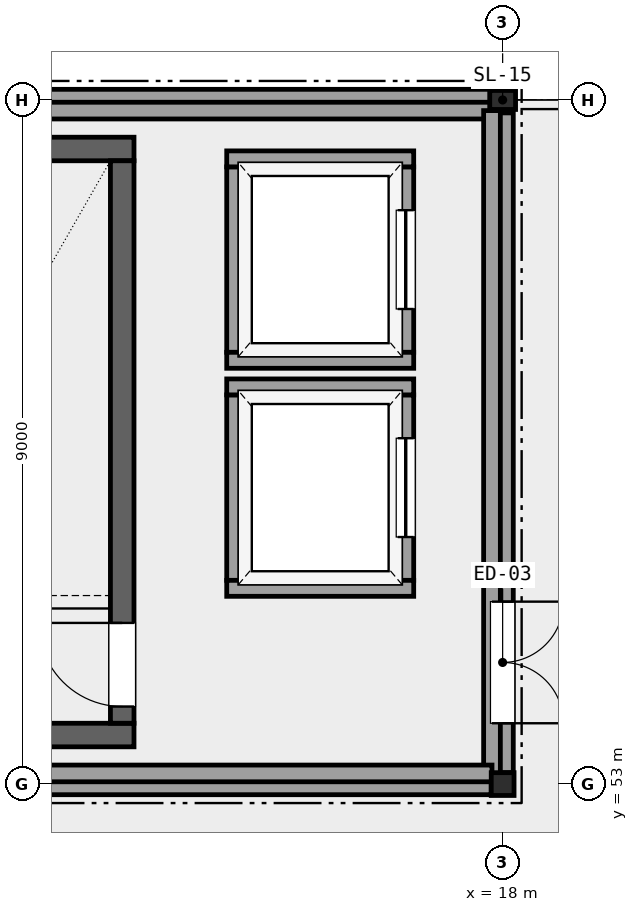
"""IFC4 building model, lengths in metres.
Left out: names, types, materials, properties, quantities, classifications, styles, units other than length and angle.
Written with IfcOpenShell. Run it as: python <this file> out.ifc"""

import sys

from ifc_helpers import new_model, si_unit, direction, frame, frame_2d, origin, origin_2d, place, context, subcontext, project, spatial, rectangle, hollow_rectangle, i_section, extrude, element, fill, save


model = new_model("IFC4")
c1 = context("Model", 3, precision=1e-05, world=origin(), true_north=direction((0.0, 1.0)))
c2 = subcontext(c1, "Body", "Model", "MODEL_VIEW")
j1 = project(units=[si_unit("LENGTHUNIT", "METRE"), si_unit("PLANEANGLEUNIT", "RADIAN")], contexts=[c1])
p1 = place(None, origin())
s1 = spatial("IfcSite", under=j1, at=p1, CompositionType="ELEMENT")
p2 = place(p1, origin())
s2 = spatial("IfcBuilding", under=s1, at=p2, CompositionType="ELEMENT")
p3 = place(p2, frame((0.0, 0.0, 13.5)))
s3 = spatial("IfcBuildingStorey", under=s2, at=p3, CompositionType="ELEMENT", Elevation=13.5)
p4 = place(p3, frame((18.0, 53.0, 0.0), z_axis=(0.0, 0.0, 1.0), x_axis=(1.0, 0.0, 0.0)))
e1 = element("IfcColumn", 1, at=p4, inside=s3, PredefinedType="COLUMN", context=c2, shape_type="SweptSolid", body=[
    extrude(hollow_rectangle(XDim=0.3, YDim=0.3, WallThickness=0.012, at=origin_2d()), origin(), (0.0, 0.0, 1.0), 4.14),
])
p5 = place(p3, frame((18.0, 62.0, 0.0), z_axis=(0.0, 0.0, 1.0), x_axis=(1.0, 0.0, 0.0)))
e2 = element("IfcColumn", 2, at=p5, inside=s3, PredefinedType="COLUMN", context=c2, shape_type="SweptSolid", body=[
    extrude(i_section(OverallWidth=0.25, OverallDepth=0.34, WebThickness=0.009, FlangeThickness=0.014, FilletRadius=0.01, at=origin_2d()), origin(), (0.0, 0.0, 1.0), 4.14),
])
for number, where, z_axis, x_axis in (
    (3, (9.125, 53.0, 0.0), (0.0, 0.0, 1.0), (1.0, 0.0, 0.0)),
    (4, (17.875, 62.0, 0.0), (0.0, 0.0, 1.0), (-1.0, 0.0, 0.0)),
):
    element("IfcWall", number, at=place(p3, frame(where, z_axis=z_axis, x_axis=x_axis)), inside=s3, PredefinedType="SOLIDWALL", context=c2, shape_type="SweptSolid", body=[
        extrude(rectangle(XDim=8.725, YDim=0.28, at=frame_2d((4.363, 0.0))), origin(), (0.0, 0.0, 1.0), 3.55),
    ])
p6 = place(p3, frame((18.0, 53.15, 0.0), z_axis=(0.0, 0.0, 1.0), x_axis=(0.0, 1.0, 0.0)))
e5 = element("IfcWall", 5, at=p6, inside=s3, PredefinedType="SOLIDWALL", context=c2, shape_type="SweptSolid", body=[
    extrude(rectangle(XDim=8.68, YDim=0.28, at=frame_2d((4.34, 0.0))), origin(), (0.0, 0.0, 1.0), 3.55),
])
p7 = place(p6, frame((2.25, 0.0, 0.0), z_axis=(0.0, 0.0, 1.0), x_axis=(-1.0, 0.0, 0.0)))
e6 = element("IfcOpeningElement", 6, at=p7, cuts=e5, PredefinedType="OPENING", context=c2, shape_type="SweptSolid", body=[
    extrude(rectangle(XDim=1.6, YDim=2.2, at=frame_2d((0.8, 1.1))), frame((0.0, 0.151, 0.0), z_axis=(0.0, -1.0, 0.0), x_axis=(1.0, 0.0, 0.0)), (0.0, 0.0, 1.0), 0.302),
])
for number, where, z_axis, x_axis in (
    (7, (9.14, 61.86, 4.2), (0.0, 0.0, 1.0), (1.0, 0.0, 0.0)),
    (8, (17.86, 61.86, 4.2), (0.0, 0.0, 1.0), (0.0, -1.0, 0.0)),
    (9, (17.86, 53.14, 4.2), (0.0, 0.0, 1.0), (-1.0, 0.0, 0.0)),
):
    element("IfcWall", number, at=place(p3, frame(where, z_axis=z_axis, x_axis=x_axis)), inside=s3, PredefinedType="PARAPET", context=c2, shape_type="SweptSolid", body=[
        extrude(rectangle(XDim=8.72, YDim=0.22, at=frame_2d((4.36, 0.0))), origin(), (0.0, 0.0, 1.0), 0.52),
    ])
for number, where, z_axis, x_axis in (
    (10, (9.25, 53.645, 0.0), (0.0, 0.0, 1.0), (1.0, 0.0, 0.0)),
    (11, (9.25, 61.355, 0.0), (0.0, 0.0, 1.0), (1.0, 0.0, 0.0)),
):
    element("IfcWall", number, at=place(p3, frame(where, z_axis=z_axis, x_axis=x_axis)), inside=s3, PredefinedType="SHEAR", context=c2, shape_type="SweptSolid", body=[
        extrude(rectangle(XDim=3.9, YDim=0.31, at=frame_2d((1.95, 0.0))), origin(), (0.0, 0.0, 1.0), 3.94),
    ])
p8 = place(p3, frame((12.995, 53.8, 0.0), z_axis=(0.0, 0.0, 1.0), x_axis=(0.0, 1.0, 0.0)))
e12 = element("IfcWall", 12, at=p8, inside=s3, PredefinedType="SHEAR", context=c2, shape_type="SweptSolid", body=[
    extrude(rectangle(XDim=7.4, YDim=0.31, at=frame_2d((3.7, 0.0))), origin(), (0.0, 0.0, 1.0), 3.94),
])
p9 = place(p8, frame((0.22, 0.0, 0.0)))
e13 = element("IfcOpeningElement", 13, at=p9, cuts=e12, PredefinedType="OPENING", context=c2, shape_type="SweptSolid", body=[
    extrude(rectangle(XDim=1.1, YDim=2.15, at=frame_2d((0.55, 1.075))), frame((0.0, 0.166, 0.0), z_axis=(0.0, -1.0, 0.0), x_axis=(1.0, 0.0, 0.0)), (0.0, 0.0, 1.0), 0.332),
])
p10 = place(p3, frame((16.725, 55.68, 0.0), z_axis=(0.0, 0.0, 1.0), x_axis=(0.0, 1.0, 0.0)))
e14 = element("IfcWall", 14, at=p10, inside=s3, PredefinedType="PARTITIONING", context=c2, shape_type="SweptSolid", body=[
    extrude(rectangle(XDim=2.44, YDim=0.21, at=frame_2d((1.22, 0.0))), origin(), (0.0, 0.0, 1.0), 3.94),
])
p11 = place(p10, frame((0.57, 0.0, 0.0)))
e15 = element("IfcOpeningElement", 15, at=p11, cuts=e14, PredefinedType="OPENING", context=c2, shape_type="SweptSolid", body=[
    extrude(rectangle(XDim=1.3, YDim=2.2, at=frame_2d((0.65, 1.1))), frame((0.0, 0.116, 0.0), z_axis=(0.0, -1.0, 0.0), x_axis=(1.0, 0.0, 0.0)), (0.0, 0.0, 1.0), 0.232),
])
p12 = place(p3, frame((14.475, 55.68, 0.0), z_axis=(0.0, 0.0, 1.0), x_axis=(0.0, 1.0, 0.0)))
e16 = element("IfcWall", 16, at=p12, inside=s3, PredefinedType="PARTITIONING", context=c2, shape_type="SweptSolid", body=[
    extrude(rectangle(XDim=2.44, YDim=0.21, at=frame_2d((1.22, 0.0))), origin(), (0.0, 0.0, 1.0), 3.94),
])
for number, where, z_axis, x_axis in (
    (17, (14.37, 55.575, 0.0), (0.0, 0.0, 1.0), (1.0, 0.0, 0.0)),
    (18, (14.37, 58.225, 0.0), (0.0, 0.0, 1.0), (1.0, 0.0, 0.0)),
):
    element("IfcWall", number, at=place(p3, frame(where, z_axis=z_axis, x_axis=x_axis)), inside=s3, PredefinedType="PARTITIONING", context=c2, shape_type="SweptSolid", body=[
        extrude(rectangle(XDim=2.46, YDim=0.21, at=frame_2d((1.23, 0.0))), origin(), (0.0, 0.0, 1.0), 3.94),
    ])
p13 = place(p3, frame((16.725, 58.68, 0.0), z_axis=(0.0, 0.0, 1.0), x_axis=(0.0, 1.0, 0.0)))
e19 = element("IfcWall", 19, at=p13, inside=s3, PredefinedType="PARTITIONING", context=c2, shape_type="SweptSolid", body=[
    extrude(rectangle(XDim=2.44, YDim=0.21, at=frame_2d((1.22, 0.0))), origin(), (0.0, 0.0, 1.0), 3.94),
])
p14 = place(p13, frame((0.57, 0.0, 0.0)))
e20 = element("IfcOpeningElement", 20, at=p14, cuts=e19, PredefinedType="OPENING", context=c2, shape_type="SweptSolid", body=[
    extrude(rectangle(XDim=1.3, YDim=2.2, at=frame_2d((0.65, 1.1))), frame((0.0, 0.116, 0.0), z_axis=(0.0, -1.0, 0.0), x_axis=(1.0, 0.0, 0.0)), (0.0, 0.0, 1.0), 0.232),
])
p15 = place(p3, frame((14.475, 58.68, 0.0), z_axis=(0.0, 0.0, 1.0), x_axis=(0.0, 1.0, 0.0)))
e21 = element("IfcWall", 21, at=p15, inside=s3, PredefinedType="PARTITIONING", context=c2, shape_type="SweptSolid", body=[
    extrude(rectangle(XDim=2.44, YDim=0.21, at=frame_2d((1.22, 0.0))), origin(), (0.0, 0.0, 1.0), 3.94),
])
for number, where, z_axis, x_axis in (
    (22, (14.37, 58.575, 0.0), (0.0, 0.0, 1.0), (1.0, 0.0, 0.0)),
    (23, (14.37, 61.225, 0.0), (0.0, 0.0, 1.0), (1.0, 0.0, 0.0)),
):
    element("IfcWall", number, at=place(p3, frame(where, z_axis=z_axis, x_axis=x_axis)), inside=s3, PredefinedType="PARTITIONING", context=c2, shape_type="SweptSolid", body=[
        extrude(rectangle(XDim=2.46, YDim=0.21, at=frame_2d((1.23, 0.0))), origin(), (0.0, 0.0, 1.0), 3.94),
    ])
p16 = place(p7, origin())
e24 = element("IfcDoor", 24, at=p16, inside=s3, OperationType="SINGLE_SWING_LEFT", PredefinedType="DOOR", context=c2, shape_type="SweptSolid", body=[
    extrude(rectangle(XDim=1.6, YDim=2.2, at=frame_2d((0.8, 1.1))), frame((0.0, 0.025, 0.0), z_axis=(0.0, -1.0, 0.0), x_axis=(1.0, 0.0, 0.0)), (0.0, 0.0, 1.0), 0.05),
])
fill(e6, e24)
p17 = place(p9, origin())
e25 = element("IfcDoor", 25, at=p17, inside=s3, OperationType="SINGLE_SWING_RIGHT", PredefinedType="DOOR", context=c2, shape_type="SweptSolid", body=[
    extrude(rectangle(XDim=1.1, YDim=2.15, at=frame_2d((0.55, 1.075))), frame((0.0, 0.025, 0.0), z_axis=(0.0, -1.0, 0.0), x_axis=(1.0, 0.0, 0.0)), (0.0, 0.0, 1.0), 0.05),
])
fill(e13, e25)
p18 = place(p11, origin())
e26 = element("IfcDoor", 26, at=p18, inside=s3, OperationType="SLIDING_TO_RIGHT", PredefinedType="DOOR", context=c2, shape_type="SweptSolid", body=[
    extrude(rectangle(XDim=1.3, YDim=2.2, at=frame_2d((0.65, 1.1))), frame((0.0, 0.025, 0.0), z_axis=(0.0, -1.0, 0.0), x_axis=(1.0, 0.0, 0.0)), (0.0, 0.0, 1.0), 0.05),
])
fill(e15, e26)
p19 = place(p14, origin())
e27 = element("IfcDoor", 27, at=p19, inside=s3, OperationType="SLIDING_TO_LEFT", PredefinedType="DOOR", context=c2, shape_type="SweptSolid", body=[
    extrude(rectangle(XDim=1.3, YDim=2.2, at=frame_2d((0.65, 1.1))), frame((0.0, 0.025, 0.0), z_axis=(0.0, -1.0, 0.0), x_axis=(1.0, 0.0, 0.0)), (0.0, 0.0, 1.0), 0.05),
])
fill(e20, e27)
save(model, sys.argv[1])
